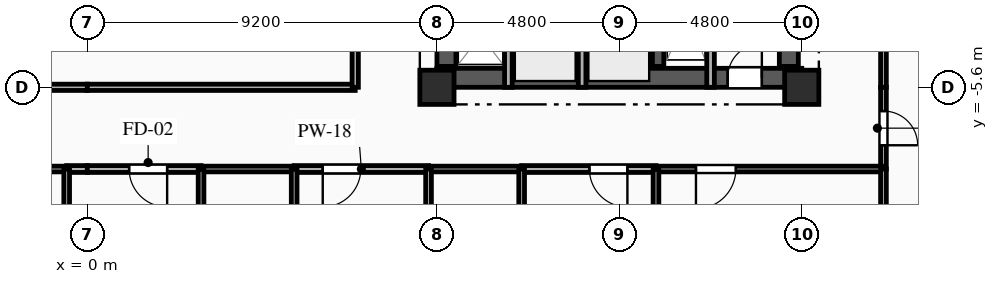
"""IFC4 building model, lengths in metres.
Left out: names, types, materials, properties, quantities, classifications, styles, units other than length and angle.
Written with IfcOpenShell. Run it as: python <this file> out.ifc"""

import sys

from ifc_helpers import new_model, si_unit, direction, frame, frame_2d, origin, origin_2d, place, context, subcontext, project, spatial, rectangle, extrude, element, fill, save


model = new_model("IFC4")
c1 = context("Model", 3, precision=1e-05, world=origin(), true_north=direction((0.0, 1.0)))
c2 = subcontext(c1, "Body", "Model", "MODEL_VIEW")
j1 = project(units=[si_unit("LENGTHUNIT", "METRE"), si_unit("PLANEANGLEUNIT", "RADIAN")], contexts=[c1])
p1 = place(None, origin())
s1 = spatial("IfcSite", under=j1, at=p1, CompositionType="ELEMENT")
p2 = place(p1, origin())
s2 = spatial("IfcBuilding", under=s1, at=p2, CompositionType="ELEMENT")
p3 = place(p2, frame((0.0, 0.0, 147.75)))
s3 = spatial("IfcBuildingStorey", under=s2, at=p3, CompositionType="ELEMENT", Elevation=147.75)
for number, where, z_axis, x_axis in (
    (1, (9.2, -5.6, 0.0), (0.0, 0.0, 1.0), (1.0, 0.0, 0.0)),
    (2, (18.8, -5.6, 0.0), (0.0, 0.0, 1.0), (1.0, 0.0, 0.0)),
):
    element("IfcColumn", number, at=place(p3, frame(where, z_axis=z_axis, x_axis=x_axis)), inside=s3, PredefinedType="COLUMN", context=c2, shape_type="SweptSolid", body=[
        extrude(rectangle(XDim=0.9, YDim=0.9, at=origin_2d()), origin(), (0.0, 0.0, 1.0), 3.35),
    ])
p4 = place(p3, frame((9.2, -5.35, 0.0), z_axis=(0.0, 0.0, 1.0), x_axis=(1.0, 0.0, 0.0)))
e3 = element("IfcWall", 3, at=p4, inside=s3, PredefinedType="SHEAR", context=c2, shape_type="SweptSolid", body=[
    extrude(rectangle(XDim=9.6, YDim=0.5, at=frame_2d((4.8, 0.0))), origin(), (0.0, 0.0, 1.0), 3.04),
])
p5 = place(p4, frame((7.65, 0.0, 0.0)))
e4 = element("IfcOpeningElement", 4, at=p5, cuts=e3, PredefinedType="OPENING", context=c2, shape_type="SweptSolid", body=[
    extrude(rectangle(XDim=0.9, YDim=2.1, at=frame_2d((0.45, 1.05))), frame((0.0, 0.26, 0.0), z_axis=(0.0, -1.0, 0.0), x_axis=(1.0, 0.0, 0.0)), (0.0, 0.0, 1.0), 0.52),
])
p6 = place(p3, frame((9.45, -5.05, 0.0), z_axis=(0.0, 0.0, 1.0), x_axis=(0.0, 1.0, 0.0)))
e5 = element("IfcWall", 5, at=p6, inside=s3, PredefinedType="SHEAR", context=c2, shape_type="SweptSolid", body=[
    extrude(rectangle(XDim=10.1, YDim=0.5, at=frame_2d((5.05, 0.0))), origin(), (0.0, 0.0, 1.0), 3.04),
])
p7 = place(p6, frame((7.15, 0.0, 0.0)))
e6 = element("IfcOpeningElement", 6, at=p7, cuts=e5, PredefinedType="OPENING", context=c2, shape_type="SweptSolid", body=[
    extrude(rectangle(XDim=0.9, YDim=2.1, at=frame_2d((0.45, 1.05))), frame((0.0, 0.26, 0.0), z_axis=(0.0, -1.0, 0.0), x_axis=(1.0, 0.0, 0.0)), (0.0, 0.0, 1.0), 0.52),
])
p8 = place(p6, frame((2.4, 0.0, 0.0)))
e7 = element("IfcOpeningElement", 7, at=p8, cuts=e5, PredefinedType="OPENING", context=c2, shape_type="SweptSolid", body=[
    extrude(rectangle(XDim=1.2, YDim=2.15, at=frame_2d((0.6, 1.075))), frame((0.0, 0.26, 0.0), z_axis=(0.0, -1.0, 0.0), x_axis=(1.0, 0.0, 0.0)), (0.0, 0.0, 1.0), 0.52),
])
p9 = place(p3, frame((18.46, -5.05, 0.0), z_axis=(0.0, 0.0, 1.0), x_axis=(0.0, 1.0, 0.0)))
e8 = element("IfcWall", 8, at=p9, inside=s3, PredefinedType="SHEAR", context=c2, shape_type="SweptSolid", body=[
    extrude(rectangle(XDim=10.1, YDim=0.5, at=frame_2d((5.05, 0.0))), origin(), (0.0, 0.0, 1.0), 3.04),
])
p10 = place(p3, frame((15.02, -5.05, 0.0), z_axis=(0.0, 0.0, 1.0), x_axis=(0.0, 1.0, 0.0)))
e9 = element("IfcWall", 9, at=p10, inside=s3, PredefinedType="SHEAR", context=c2, shape_type="SweptSolid", body=[
    extrude(rectangle(XDim=10.1, YDim=0.3, at=frame_2d((5.05, 0.0))), origin(), (0.0, 0.0, 1.0), 3.04),
])
p11 = place(p3, frame((16.4, -2.11, 0.0), z_axis=(0.0, 0.0, 1.0), x_axis=(0.0, -1.0, 0.0)))
e10 = element("IfcWall", 10, at=p11, inside=s3, PredefinedType="PARTITIONING", context=c2, shape_type="SweptSolid", body=[
    extrude(rectangle(XDim=3.49, YDim=0.2, at=frame_2d((1.745, 0.0))), origin(), (0.0, 0.0, 1.0), 3.04),
])
for number, where, z_axis, x_axis in (
    (11, (11.08, -5.6, 0.0), (0.0, 0.0, 1.0), (0.0, 1.0, 0.0)),
    (12, (13.02, -5.6, 0.0), (0.0, 0.0, 1.0), (0.0, 1.0, 0.0)),
):
    element("IfcWall", number, at=place(p3, frame(where, z_axis=z_axis, x_axis=x_axis)), inside=s3, PredefinedType="PARTITIONING", context=c2, shape_type="SweptSolid", body=[
        extrude(rectangle(XDim=2.25, YDim=0.2, at=frame_2d((1.125, 0.0))), origin(), (0.0, 0.0, 1.0), 3.04),
    ])
p12 = place(p3, frame((0.0, -7.75, 0.0), z_axis=(0.0, 0.0, 1.0), x_axis=(-1.0, 0.0, 0.0)))
e13 = element("IfcWall", 13, at=p12, inside=s3, PredefinedType="PARTITIONING", context=c2, shape_type="SweptSolid", body=[
    extrude(rectangle(XDim=0.543, YDim=0.18, at=frame_2d((0.271, 0.0))), origin(), (0.0, 0.0, 1.0), 3.04),
])
p13 = place(p3, frame((-0.543, -7.75, 0.0), z_axis=(0.0, 0.0, 1.0), x_axis=(-1.0, 0.0, 0.0)))
e14 = element("IfcWall", 14, at=p13, inside=s3, PredefinedType="PLUMBINGWALL", context=c2, shape_type="SweptSolid", body=[
    extrude(rectangle(XDim=2.45, YDim=0.15, at=frame_2d((1.225, 0.0))), origin(), (0.0, 0.0, 1.0), 3.04),
])
p14 = place(p3, frame((-7.05, -5.6, 0.0), z_axis=(0.0, 0.0, 1.0), x_axis=(1.0, 0.0, 0.0)))
e15 = element("IfcWall", 15, at=p14, inside=s3, PredefinedType="PARTITIONING", context=c2, shape_type="SweptSolid", body=[
    extrude(rectangle(XDim=7.05, YDim=0.165, at=frame_2d((3.525, 0.0))), origin(), (0.0, 0.0, 1.0), 2.525),
])
p15 = place(p3, frame((20.95, -5.6, 0.0), z_axis=(0.0, 0.0, 1.0), x_axis=(0.0, -1.0, 0.0)))
e16 = element("IfcWall", 16, at=p15, inside=s3, PredefinedType="PARTITIONING", context=c2, shape_type="SweptSolid", body=[
    extrude(rectangle(XDim=2.15, YDim=0.15, at=frame_2d((1.075, 0.0))), origin(), (0.0, 0.0, 1.0), 3.04),
])
p16 = place(p15, frame((0.625, 0.0, 0.0)))
e17 = element("IfcOpeningElement", 17, at=p16, cuts=e16, PredefinedType="OPENING", context=c2, shape_type="SweptSolid", body=[
    extrude(rectangle(XDim=0.9, YDim=2.1, at=frame_2d((0.45, 1.05))), frame((0.0, 0.085, 0.0), z_axis=(0.0, -1.0, 0.0), x_axis=(1.0, 0.0, 0.0)), (0.0, 0.0, 1.0), 0.17),
])
p17 = place(p3, frame((2.993, -7.75, 0.0), z_axis=(0.0, 0.0, 1.0), x_axis=(-1.0, 0.0, 0.0)))
e18 = element("IfcWall", 18, at=p17, inside=s3, PredefinedType="PARTITIONING", context=c2, shape_type="SweptSolid", body=[
    extrude(rectangle(XDim=2.993, YDim=0.18, at=frame_2d((1.497, 0.0))), origin(), (0.0, 0.0, 1.0), 3.04),
])
p18 = place(p17, frame((0.892, 0.0, 0.0)))
e19 = element("IfcOpeningElement", 19, at=p18, cuts=e18, PredefinedType="OPENING", context=c2, shape_type="SweptSolid", body=[
    extrude(rectangle(XDim=1.0, YDim=2.15, at=frame_2d((0.5, 1.075))), frame((0.0, 0.1, 0.0), z_axis=(0.0, -1.0, 0.0), x_axis=(1.0, 0.0, 0.0)), (0.0, 0.0, 1.0), 0.2),
])
p19 = place(p3, frame((8.979, -7.75, 0.0), z_axis=(0.0, 0.0, 1.0), x_axis=(-1.0, 0.0, 0.0)))
e20 = element("IfcWall", 20, at=p19, inside=s3, PredefinedType="PARTITIONING", context=c2, shape_type="SweptSolid", body=[
    extrude(rectangle(XDim=3.536, YDim=0.18, at=frame_2d((1.768, 0.0))), origin(), (0.0, 0.0, 1.0), 3.04),
])
p20 = place(p19, frame((1.784, 0.0, 0.0)))
e21 = element("IfcOpeningElement", 21, at=p20, cuts=e20, PredefinedType="OPENING", context=c2, shape_type="SweptSolid", body=[
    extrude(rectangle(XDim=1.0, YDim=2.15, at=frame_2d((0.5, 1.075))), frame((0.0, 0.1, 0.0), z_axis=(0.0, -1.0, 0.0), x_axis=(1.0, 0.0, 0.0)), (0.0, 0.0, 1.0), 0.2),
])
p21 = place(p3, frame((5.443, -7.75, 0.0), z_axis=(0.0, 0.0, 1.0), x_axis=(-1.0, 0.0, 0.0)))
e22 = element("IfcWall", 22, at=p21, inside=s3, PredefinedType="PLUMBINGWALL", context=c2, shape_type="SweptSolid", body=[
    extrude(rectangle(XDim=2.45, YDim=0.15, at=frame_2d((1.225, 0.0))), origin(), (0.0, 0.0, 1.0), 3.04),
])
p22 = place(p3, frame((14.964, -7.75, 0.0), z_axis=(0.0, 0.0, 1.0), x_axis=(-1.0, 0.0, 0.0)))
e23 = element("IfcWall", 23, at=p22, inside=s3, PredefinedType="PARTITIONING", context=c2, shape_type="SweptSolid", body=[
    extrude(rectangle(XDim=3.535, YDim=0.18, at=frame_2d((1.768, 0.0))), origin(), (0.0, 0.0, 1.0), 3.04),
])
p23 = place(p22, frame((0.752, 0.0, 0.0)))
e24 = element("IfcOpeningElement", 24, at=p23, cuts=e23, PredefinedType="OPENING", context=c2, shape_type="SweptSolid", body=[
    extrude(rectangle(XDim=1.0, YDim=2.15, at=frame_2d((0.5, 1.075))), frame((0.0, 0.1, 0.0), z_axis=(0.0, -1.0, 0.0), x_axis=(1.0, 0.0, 0.0)), (0.0, 0.0, 1.0), 0.2),
])
p24 = place(p3, frame((11.429, -7.75, 0.0), z_axis=(0.0, 0.0, 1.0), x_axis=(-1.0, 0.0, 0.0)))
e25 = element("IfcWall", 25, at=p24, inside=s3, PredefinedType="PLUMBINGWALL", context=c2, shape_type="SweptSolid", body=[
    extrude(rectangle(XDim=2.45, YDim=0.15, at=frame_2d((1.225, 0.0))), origin(), (0.0, 0.0, 1.0), 3.04),
])
p25 = place(p3, frame((20.95, -7.75, 0.0), z_axis=(0.0, 0.0, 1.0), x_axis=(-1.0, 0.0, 0.0)))
e26 = element("IfcWall", 26, at=p25, inside=s3, PredefinedType="PARTITIONING", context=c2, shape_type="SweptSolid", body=[
    extrude(rectangle(XDim=5.986, YDim=0.15, at=frame_2d((2.993, 0.0))), origin(), (0.0, 0.0, 1.0), 3.04),
])
p26 = place(p25, frame((3.884, 0.0, 0.0)))
e27 = element("IfcOpeningElement", 27, at=p26, cuts=e26, PredefinedType="OPENING", context=c2, shape_type="SweptSolid", body=[
    extrude(rectangle(XDim=1.05, YDim=2.15, at=frame_2d((0.525, 1.075))), frame((0.0, 0.085, 0.0), z_axis=(0.0, -1.0, 0.0), x_axis=(1.0, 0.0, 0.0)), (0.0, 0.0, 1.0), 0.17),
])
p27 = place(p3, frame((0.0, -5.6, 0.0), z_axis=(0.0, 0.0, 1.0), x_axis=(1.0, 0.0, 0.0)))
e28 = element("IfcWall", 28, at=p27, inside=s3, PredefinedType="PARTITIONING", context=c2, shape_type="SweptSolid", body=[
    extrude(rectangle(XDim=7.05, YDim=0.165, at=frame_2d((3.525, 0.0))), origin(), (0.0, 0.0, 1.0), 2.525),
])
p28 = place(p3, frame((20.95, -3.46, 0.0), z_axis=(0.0, 0.0, 1.0), x_axis=(0.0, -1.0, 0.0)))
e29 = element("IfcWall", 29, at=p28, inside=s3, PredefinedType="PARTITIONING", context=c2, shape_type="SweptSolid", body=[
    extrude(rectangle(XDim=2.14, YDim=0.15, at=frame_2d((1.07, 0.0))), origin(), (0.0, 0.0, 1.0), 3.04),
])
p29 = place(p3, frame((7.05, -5.6, 0.0), z_axis=(0.0, 0.0, 1.0), x_axis=(0.0, 1.0, 0.0)))
e30 = element("IfcWall", 30, at=p29, inside=s3, PredefinedType="PARTITIONING", context=c2, shape_type="SweptSolid", body=[
    extrude(rectangle(XDim=2.65, YDim=0.165, at=frame_2d((1.325, 0.0))), origin(), (0.0, 0.0, 1.0), 3.04),
])
p30 = place(p3, frame((20.95, -15.6, 0.0), z_axis=(0.0, 0.0, 1.0), x_axis=(0.0, 1.0, 0.0)))
e31 = element("IfcWall", 31, at=p30, inside=s3, PredefinedType="PARTITIONING", context=c2, shape_type="SweptSolid", body=[
    extrude(rectangle(XDim=7.85, YDim=0.15, at=frame_2d((3.925, 0.0))), origin(), (0.0, 0.0, 1.0), 3.04),
])
for number, where, z_axis, x_axis in (
    (32, (-0.543, -9.9, 0.0), (0.0, 0.0, 1.0), (0.0, 1.0, 0.0)),
    (33, (2.993, -7.75, 0.0), (0.0, 0.0, 1.0), (0.0, -1.0, 0.0)),
    (34, (5.443, -9.9, 0.0), (0.0, 0.0, 1.0), (0.0, 1.0, 0.0)),
    (35, (8.979, -7.75, 0.0), (0.0, 0.0, 1.0), (0.0, -1.0, 0.0)),
    (36, (11.429, -9.9, 0.0), (0.0, 0.0, 1.0), (0.0, 1.0, 0.0)),
):
    element("IfcWall", number, at=place(p3, frame(where, z_axis=z_axis, x_axis=x_axis)), inside=s3, PredefinedType="PLUMBINGWALL", context=c2, shape_type="SweptSolid", body=[
        extrude(rectangle(XDim=2.15, YDim=0.15, at=frame_2d((1.075, 0.0))), origin(), (0.0, 0.0, 1.0), 3.04),
    ])
p31 = place(p3, frame((14.964, -7.75, 0.0), z_axis=(0.0, 0.0, 1.0), x_axis=(0.0, -1.0, 0.0)))
e37 = element("IfcWall", 37, at=p31, inside=s3, PredefinedType="PARTITIONING", context=c2, shape_type="SweptSolid", body=[
    extrude(rectangle(XDim=7.85, YDim=0.15, at=frame_2d((3.925, 0.0))), origin(), (0.0, 0.0, 1.0), 3.04),
])
p32 = place(p5, origin())
e38 = element("IfcDoor", 38, at=p32, inside=s3, OperationType="SINGLE_SWING_RIGHT", PredefinedType="DOOR", context=c2, shape_type="SweptSolid", body=[
    extrude(rectangle(XDim=0.9, YDim=2.1, at=frame_2d((0.45, 1.05))), frame((0.0, 0.025, 0.0), z_axis=(0.0, -1.0, 0.0), x_axis=(1.0, 0.0, 0.0)), (0.0, 0.0, 1.0), 0.05),
])
fill(e4, e38)
p33 = place(p16, origin())
e39 = element("IfcDoor", 39, at=p33, inside=s3, OperationType="SINGLE_SWING_RIGHT", PredefinedType="DOOR", context=c2, shape_type="SweptSolid", body=[
    extrude(rectangle(XDim=0.9, YDim=2.1, at=frame_2d((0.45, 1.05))), frame((0.0, 0.025, 0.0), z_axis=(0.0, -1.0, 0.0), x_axis=(1.0, 0.0, 0.0)), (0.0, 0.0, 1.0), 0.05),
])
fill(e17, e39)
p34 = place(p18, origin())
e40 = element("IfcDoor", 40, at=p34, inside=s3, OperationType="SINGLE_SWING_LEFT", PredefinedType="DOOR", context=c2, shape_type="SweptSolid", body=[
    extrude(rectangle(XDim=1.0, YDim=2.15, at=frame_2d((0.5, 1.075))), frame((0.0, 0.025, 0.0), z_axis=(0.0, -1.0, 0.0), x_axis=(1.0, 0.0, 0.0)), (0.0, 0.0, 1.0), 0.05),
])
fill(e19, e40)
p35 = place(p20, origin())
e41 = element("IfcDoor", 41, at=p35, inside=s3, OperationType="SINGLE_SWING_RIGHT", PredefinedType="DOOR", context=c2, shape_type="SweptSolid", body=[
    extrude(rectangle(XDim=1.0, YDim=2.15, at=frame_2d((0.5, 1.075))), frame((0.0, 0.025, 0.0), z_axis=(0.0, -1.0, 0.0), x_axis=(1.0, 0.0, 0.0)), (0.0, 0.0, 1.0), 0.05),
])
fill(e21, e41)
p36 = place(p23, origin())
e42 = element("IfcDoor", 42, at=p36, inside=s3, OperationType="SINGLE_SWING_LEFT", PredefinedType="DOOR", context=c2, shape_type="SweptSolid", body=[
    extrude(rectangle(XDim=1.0, YDim=2.15, at=frame_2d((0.5, 1.075))), frame((0.0, 0.025, 0.0), z_axis=(0.0, -1.0, 0.0), x_axis=(1.0, 0.0, 0.0)), (0.0, 0.0, 1.0), 0.05),
])
fill(e24, e42)
p37 = place(p26, origin())
e43 = element("IfcDoor", 43, at=p37, inside=s3, OperationType="SINGLE_SWING_RIGHT", PredefinedType="DOOR", context=c2, shape_type="SweptSolid", body=[
    extrude(rectangle(XDim=1.05, YDim=2.15, at=frame_2d((0.525, 1.075))), frame((0.0, 0.025, 0.0), z_axis=(0.0, -1.0, 0.0), x_axis=(1.0, 0.0, 0.0)), (0.0, 0.0, 1.0), 0.05),
])
fill(e27, e43)
save(model, sys.argv[1])
